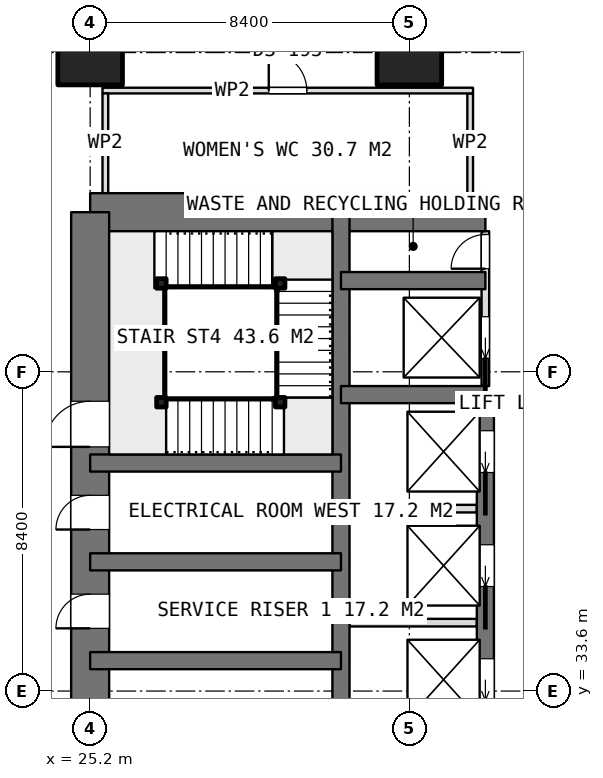
"""IFC4 building model, lengths in metres.
Left out: names, types, materials, properties, quantities, classifications, styles, units other than length and angle.
Written with IfcOpenShell. Run it as: python <this file> out.ifc"""

import sys

from ifc_helpers import new_model, si_unit, direction, frame, frame_2d, origin, origin_2d, place, context, subcontext, project, spatial, rectangle, extrude, element, fill, save


model = new_model("IFC4")
c1 = context("Model", 3, precision=1e-05, world=origin(), true_north=direction((0.0, 1.0)))
c2 = subcontext(c1, "Body", "Model", "MODEL_VIEW")
j1 = project(units=[si_unit("LENGTHUNIT", "METRE"), si_unit("PLANEANGLEUNIT", "RADIAN")], contexts=[c1])
p1 = place(None, origin())
s1 = spatial("IfcSite", under=j1, at=p1, CompositionType="ELEMENT")
p2 = place(p1, origin())
s2 = spatial("IfcBuilding", under=s1, at=p2, CompositionType="ELEMENT")
p3 = place(p2, frame((0.0, 0.0, 183.95)))
s3 = spatial("IfcBuildingStorey", under=s2, at=p3, CompositionType="ELEMENT", Elevation=183.95)
p4 = place(p3, frame((25.2, 46.2, 0.0), z_axis=(0.0, 0.0, 1.0), x_axis=(1.0, 0.0, 0.0)))
e1 = element("IfcWall", 1, at=p4, inside=s3, PredefinedType="SHEAR", context=c2, shape_type="SweptSolid", body=[
    extrude(rectangle(XDim=10.4, YDim=1.0, at=frame_2d((5.2, 0.0))), origin(), (0.0, 0.0, 1.0), 3.75),
])
p5 = place(p3, frame((25.2, 21.0, 0.0), z_axis=(0.0, 0.0, 1.0), x_axis=(0.0, 1.0, 0.0)))
e2 = element("IfcWall", 2, at=p5, inside=s3, PredefinedType="SHEAR", context=c2, shape_type="SweptSolid", body=[
    extrude(rectangle(XDim=25.2, YDim=1.0, at=frame_2d((12.6, 0.0))), origin(), (0.0, 0.0, 1.0), 3.75),
])
p6 = place(p5, frame((7.8, 0.0, 0.0)))
e3 = element("IfcOpeningElement", 3, at=p6, cuts=e2, PredefinedType="OPENING", context=c2, shape_type="SweptSolid", body=[
    extrude(rectangle(XDim=1.2, YDim=2.1, at=frame_2d((0.6, 1.05))), frame((0.0, 0.51, 0.0), z_axis=(0.0, -1.0, 0.0), x_axis=(1.0, 0.0, 0.0)), (0.0, 0.0, 1.0), 1.02),
])
p7 = place(p5, frame((14.25, 0.0, 0.0)))
e4 = element("IfcOpeningElement", 4, at=p7, cuts=e2, PredefinedType="OPENING", context=c2, shape_type="SweptSolid", body=[
    extrude(rectangle(XDim=0.9, YDim=2.1, at=frame_2d((0.45, 1.05))), frame((0.0, 0.51, 0.0), z_axis=(0.0, -1.0, 0.0), x_axis=(1.0, 0.0, 0.0)), (0.0, 0.0, 1.0), 1.02),
])
p8 = place(p5, frame((16.85, 0.0, 0.0)))
e5 = element("IfcOpeningElement", 5, at=p8, cuts=e2, PredefinedType="OPENING", context=c2, shape_type="SweptSolid", body=[
    extrude(rectangle(XDim=0.9, YDim=2.1, at=frame_2d((0.45, 1.05))), frame((0.0, 0.51, 0.0), z_axis=(0.0, -1.0, 0.0), x_axis=(1.0, 0.0, 0.0)), (0.0, 0.0, 1.0), 1.02),
])
p9 = place(p5, frame((19.025, 0.0, 0.0)))
e6 = element("IfcOpeningElement", 6, at=p9, cuts=e2, PredefinedType="OPENING", context=c2, shape_type="SweptSolid", body=[
    extrude(rectangle(XDim=1.2, YDim=2.1, at=frame_2d((0.6, 1.05))), frame((0.0, 0.51, 0.0), z_axis=(0.0, -1.0, 0.0), x_axis=(1.0, 0.0, 0.0)), (0.0, 0.0, 1.0), 1.02),
])
p10 = place(p3, frame((31.8, 21.0, 0.0), z_axis=(0.0, 0.0, 1.0), x_axis=(0.0, 1.0, 0.0)))
e7 = element("IfcWall", 7, at=p10, inside=s3, PredefinedType="SHEAR", context=c2, shape_type="SweptSolid", body=[
    extrude(rectangle(XDim=25.2, YDim=0.45, at=frame_2d((12.6, 0.0))), origin(), (0.0, 0.0, 1.0), 3.75),
])
p11 = place(p3, frame((35.6, 23.4, 0.0), z_axis=(0.0, 0.0, 1.0), x_axis=(0.0, 1.0, 0.0)))
e8 = element("IfcWall", 8, at=p11, inside=s3, PredefinedType="SHEAR", context=c2, shape_type="SweptSolid", body=[
    extrude(rectangle(XDim=18.0, YDim=0.45, at=frame_2d((9.0, 0.0))), origin(), (0.0, 0.0, 1.0), 3.75),
])
p12 = place(p11, frame((0.95, 0.0, 0.0)))
e9 = element("IfcOpeningElement", 9, at=p12, cuts=e8, PredefinedType="OPENING", context=c2, shape_type="SweptSolid", body=[
    extrude(rectangle(XDim=1.1, YDim=2.1, at=frame_2d((0.55, 1.05))), frame((0.0, 0.235, 0.0), z_axis=(0.0, -1.0, 0.0), x_axis=(1.0, 0.0, 0.0)), (0.0, 0.0, 1.0), 0.47),
])
p13 = place(p11, frame((3.95, 0.0, 0.0)))
e10 = element("IfcOpeningElement", 10, at=p13, cuts=e8, PredefinedType="OPENING", context=c2, shape_type="SweptSolid", body=[
    extrude(rectangle(XDim=1.1, YDim=2.1, at=frame_2d((0.55, 1.05))), frame((0.0, 0.235, 0.0), z_axis=(0.0, -1.0, 0.0), x_axis=(1.0, 0.0, 0.0)), (0.0, 0.0, 1.0), 0.47),
])
p14 = place(p11, frame((6.95, 0.0, 0.0)))
e11 = element("IfcOpeningElement", 11, at=p14, cuts=e8, PredefinedType="OPENING", context=c2, shape_type="SweptSolid", body=[
    extrude(rectangle(XDim=1.1, YDim=2.1, at=frame_2d((0.55, 1.05))), frame((0.0, 0.235, 0.0), z_axis=(0.0, -1.0, 0.0), x_axis=(1.0, 0.0, 0.0)), (0.0, 0.0, 1.0), 0.47),
])
p15 = place(p11, frame((9.95, 0.0, 0.0)))
e12 = element("IfcOpeningElement", 12, at=p15, cuts=e8, PredefinedType="OPENING", context=c2, shape_type="SweptSolid", body=[
    extrude(rectangle(XDim=1.1, YDim=2.1, at=frame_2d((0.55, 1.05))), frame((0.0, 0.235, 0.0), z_axis=(0.0, -1.0, 0.0), x_axis=(1.0, 0.0, 0.0)), (0.0, 0.0, 1.0), 0.47),
])
p16 = place(p11, frame((12.95, 0.0, 0.0)))
e13 = element("IfcOpeningElement", 13, at=p16, cuts=e8, PredefinedType="OPENING", context=c2, shape_type="SweptSolid", body=[
    extrude(rectangle(XDim=1.1, YDim=2.1, at=frame_2d((0.55, 1.05))), frame((0.0, 0.235, 0.0), z_axis=(0.0, -1.0, 0.0), x_axis=(1.0, 0.0, 0.0)), (0.0, 0.0, 1.0), 0.47),
])
p17 = place(p11, frame((15.95, 0.0, 0.0)))
e14 = element("IfcOpeningElement", 14, at=p17, cuts=e8, PredefinedType="OPENING", context=c2, shape_type="SweptSolid", body=[
    extrude(rectangle(XDim=1.1, YDim=2.1, at=frame_2d((0.55, 1.05))), frame((0.0, 0.235, 0.0), z_axis=(0.0, -1.0, 0.0), x_axis=(1.0, 0.0, 0.0)), (0.0, 0.0, 1.0), 0.47),
])
for number, where, z_axis, x_axis in (
    (15, (31.8, 41.4, 0.0), (0.0, 0.0, 1.0), (1.0, 0.0, 0.0)),
    (16, (31.8, 44.4, 0.0), (0.0, 0.0, 1.0), (1.0, 0.0, 0.0)),
):
    element("IfcWall", number, at=place(p3, frame(where, z_axis=z_axis, x_axis=x_axis)), inside=s3, PredefinedType="SHEAR", context=c2, shape_type="SweptSolid", body=[
        extrude(rectangle(XDim=3.8, YDim=0.45, at=frame_2d((1.9, 0.0))), origin(), (0.0, 0.0, 1.0), 3.75),
    ])
for number, where, z_axis, x_axis in (
    (17, (25.2, 34.4, 0.0), (0.0, 0.0, 1.0), (1.0, 0.0, 0.0)),
    (18, (25.2, 37.0, 0.0), (0.0, 0.0, 1.0), (1.0, 0.0, 0.0)),
    (19, (25.2, 39.6, 0.0), (0.0, 0.0, 1.0), (1.0, 0.0, 0.0)),
):
    element("IfcWall", number, at=place(p3, frame(where, z_axis=z_axis, x_axis=x_axis)), inside=s3, PredefinedType="SHEAR", context=c2, shape_type="SweptSolid", body=[
        extrude(rectangle(XDim=6.6, YDim=0.45, at=frame_2d((3.3, 0.0))), origin(), (0.0, 0.0, 1.0), 3.75),
    ])
for number, where, z_axis, x_axis in (
    (20, (25.2, 50.4, 0.0), (0.0, 0.0, 1.0), (1.0, 0.0, 0.0)),
    (21, (33.6, 50.4, 0.0), (0.0, 0.0, 1.0), (1.0, 0.0, 0.0)),
):
    element("IfcColumn", number, at=place(p3, frame(where, z_axis=z_axis, x_axis=x_axis)), inside=s3, PredefinedType="COLUMN", context=c2, shape_type="SweptSolid", body=[
        extrude(rectangle(XDim=1.7, YDim=1.7, at=origin_2d()), origin(), (0.0, 0.0, 1.0), 3.75),
    ])
for number, where, z_axis, x_axis in (
    (22, (32.025, 35.4, 0.0), (0.0, 0.0, 1.0), (1.0, 0.0, 0.0)),
    (23, (32.025, 38.4, 0.0), (0.0, 0.0, 1.0), (1.0, 0.0, 0.0)),
):
    element("IfcWall", number, at=place(p3, frame(where, z_axis=z_axis, x_axis=x_axis)), inside=s3, PredefinedType="PARTITIONING", context=c2, shape_type="SweptSolid", body=[
        extrude(rectangle(XDim=3.35, YDim=0.2, at=frame_2d((1.675, 0.0))), origin(), (0.0, 0.0, 1.0), 3.5),
    ])
p18 = place(p3, frame((35.6, 41.625, 0.0), z_axis=(0.0, 0.0, 1.0), x_axis=(0.0, 1.0, 0.0)))
e24 = element("IfcWall", 24, at=p18, inside=s3, PredefinedType="PARTITIONING", context=c2, shape_type="SweptSolid", body=[
    extrude(rectangle(XDim=4.075, YDim=0.2, at=frame_2d((2.038, 0.0))), origin(), (0.0, 0.0, 1.0), 3.5),
])
p19 = place(p18, frame((3.088, 0.0, 0.0)))
e25 = element("IfcOpeningElement", 25, at=p19, cuts=e24, PredefinedType="OPENING", context=c2, shape_type="SweptSolid", body=[
    extrude(rectangle(XDim=0.9, YDim=2.1, at=frame_2d((0.45, 1.05))), frame((0.0, 0.11, 0.0), z_axis=(0.0, -1.0, 0.0), x_axis=(1.0, 0.0, 0.0)), (0.0, 0.0, 1.0), 0.22),
])
p20 = place(p18, frame((0.725, 0.0, 0.0)))
e26 = element("IfcOpeningElement", 26, at=p20, cuts=e24, PredefinedType="OPENING", context=c2, shape_type="SweptSolid", body=[
    extrude(rectangle(XDim=1.1, YDim=2.1, at=frame_2d((0.55, 1.05))), frame((0.0, 0.11, 0.0), z_axis=(0.0, -1.0, 0.0), x_axis=(1.0, 0.0, 0.0)), (0.0, 0.0, 1.0), 0.22),
])
p21 = place(p3, frame((25.525, 49.4, 0.0), z_axis=(0.0, 0.0, 1.0), x_axis=(1.0, 0.0, 0.0)))
e27 = element("IfcWall", 27, at=p21, inside=s3, PredefinedType="PARTITIONING", context=c2, shape_type="SweptSolid", body=[
    extrude(rectangle(XDim=9.75, YDim=0.15, at=frame_2d((4.875, 0.0))), origin(), (0.0, 0.0, 1.0), 3.5),
])
p22 = place(p21, frame((4.375, 0.0, 0.0)))
e28 = element("IfcOpeningElement", 28, at=p22, cuts=e27, PredefinedType="OPENING", context=c2, shape_type="SweptSolid", body=[
    extrude(rectangle(XDim=1.0, YDim=2.1, at=frame_2d((0.5, 1.05))), frame((0.0, 0.085, 0.0), z_axis=(0.0, -1.0, 0.0), x_axis=(1.0, 0.0, 0.0)), (0.0, 0.0, 1.0), 0.17),
])
for number, where, z_axis, x_axis in (
    (29, (25.6, 46.7, 0.0), (0.0, 0.0, 1.0), (0.0, 1.0, 0.0)),
    (30, (35.2, 46.7, 0.0), (0.0, 0.0, 1.0), (0.0, 1.0, 0.0)),
):
    element("IfcWall", number, at=place(p3, frame(where, z_axis=z_axis, x_axis=x_axis)), inside=s3, PredefinedType="PARTITIONING", context=c2, shape_type="SweptSolid", body=[
        extrude(rectangle(XDim=2.625, YDim=0.15, at=frame_2d((1.312, 0.0))), origin(), (0.0, 0.0, 1.0), 3.5),
    ])
for number, where, z_axis, x_axis in (
    (31, (27.075, 41.2, 0.0), (0.0, 0.0, 1.0), (1.0, 0.0, 0.0)),
    (32, (30.2, 41.2, 0.0), (0.0, 0.0, 1.0), (1.0, 0.0, 0.0)),
    (33, (30.2, 44.325, 0.0), (0.0, 0.0, 1.0), (1.0, 0.0, 0.0)),
    (34, (27.075, 44.325, 0.0), (0.0, 0.0, 1.0), (1.0, 0.0, 0.0)),
):
    element("IfcColumn", number, at=place(p3, frame(where, z_axis=z_axis, x_axis=x_axis)), inside=s3, PredefinedType="COLUMN", context=c2, shape_type="SweptSolid", body=[
        extrude(rectangle(XDim=0.25, YDim=0.25, at=origin_2d()), origin(), (0.0, 0.0, 1.0), 3.75),
    ])
p23 = place(p7, origin())
e35 = element("IfcDoor", 35, at=p23, inside=s3, OperationType="SINGLE_SWING_LEFT", PredefinedType="DOOR", context=c2, shape_type="SweptSolid", body=[
    extrude(rectangle(XDim=0.9, YDim=2.1, at=frame_2d((0.45, 1.05))), frame((0.0, 0.025, 0.0), z_axis=(0.0, -1.0, 0.0), x_axis=(1.0, 0.0, 0.0)), (0.0, 0.0, 1.0), 0.05),
])
fill(e4, e35)
p24 = place(p8, origin())
e36 = element("IfcDoor", 36, at=p24, inside=s3, OperationType="SINGLE_SWING_LEFT", PredefinedType="DOOR", context=c2, shape_type="SweptSolid", body=[
    extrude(rectangle(XDim=0.9, YDim=2.1, at=frame_2d((0.45, 1.05))), frame((0.0, 0.025, 0.0), z_axis=(0.0, -1.0, 0.0), x_axis=(1.0, 0.0, 0.0)), (0.0, 0.0, 1.0), 0.05),
])
fill(e5, e36)
p25 = place(p19, origin())
e37 = element("IfcDoor", 37, at=p25, inside=s3, OperationType="SINGLE_SWING_LEFT", PredefinedType="DOOR", context=c2, shape_type="SweptSolid", body=[
    extrude(rectangle(XDim=0.9, YDim=2.1, at=frame_2d((0.45, 1.05))), frame((0.0, 0.025, 0.0), z_axis=(0.0, -1.0, 0.0), x_axis=(1.0, 0.0, 0.0)), (0.0, 0.0, 1.0), 0.05),
])
fill(e25, e37)
p26 = place(p15, origin())
e38 = element("IfcDoor", 38, at=p26, inside=s3, OperationType="SLIDING_TO_LEFT", PredefinedType="USERDEFINED", context=c2, shape_type="SweptSolid", body=[
    extrude(rectangle(XDim=1.1, YDim=2.1, at=frame_2d((0.55, 1.05))), frame((0.0, 0.025, 0.0), z_axis=(0.0, -1.0, 0.0), x_axis=(1.0, 0.0, 0.0)), (0.0, 0.0, 1.0), 0.05),
])
fill(e12, e38)
p27 = place(p16, origin())
e39 = element("IfcDoor", 39, at=p27, inside=s3, OperationType="SLIDING_TO_LEFT", PredefinedType="USERDEFINED", context=c2, shape_type="SweptSolid", body=[
    extrude(rectangle(XDim=1.1, YDim=2.1, at=frame_2d((0.55, 1.05))), frame((0.0, 0.025, 0.0), z_axis=(0.0, -1.0, 0.0), x_axis=(1.0, 0.0, 0.0)), (0.0, 0.0, 1.0), 0.05),
])
fill(e13, e39)
p28 = place(p17, origin())
e40 = element("IfcDoor", 40, at=p28, inside=s3, OperationType="SLIDING_TO_LEFT", PredefinedType="USERDEFINED", context=c2, shape_type="SweptSolid", body=[
    extrude(rectangle(XDim=1.1, YDim=2.1, at=frame_2d((0.55, 1.05))), frame((0.0, 0.025, 0.0), z_axis=(0.0, -1.0, 0.0), x_axis=(1.0, 0.0, 0.0)), (0.0, 0.0, 1.0), 0.05),
])
fill(e14, e40)
p29 = place(p20, origin())
e41 = element("IfcDoor", 41, at=p29, inside=s3, OperationType="SLIDING_TO_LEFT", PredefinedType="USERDEFINED", context=c2, shape_type="SweptSolid", body=[
    extrude(rectangle(XDim=1.1, YDim=2.1, at=frame_2d((0.55, 1.05))), frame((0.0, 0.025, 0.0), z_axis=(0.0, -1.0, 0.0), x_axis=(1.0, 0.0, 0.0)), (0.0, 0.0, 1.0), 0.05),
])
fill(e26, e41)
p30 = place(p22, origin())
e42 = element("IfcDoor", 42, at=p30, inside=s3, OperationType="SINGLE_SWING_LEFT", PredefinedType="DOOR", context=c2, shape_type="SweptSolid", body=[
    extrude(rectangle(XDim=1.0, YDim=2.1, at=frame_2d((0.5, 1.05))), frame((0.0, 0.025, 0.0), z_axis=(0.0, -1.0, 0.0), x_axis=(1.0, 0.0, 0.0)), (0.0, 0.0, 1.0), 0.05),
])
fill(e28, e42)
p31 = place(p9, origin())
e43 = element("IfcDoor", 43, at=p31, inside=s3, OperationType="SINGLE_SWING_RIGHT", PredefinedType="DOOR", context=c2, shape_type="SweptSolid", body=[
    extrude(rectangle(XDim=1.2, YDim=2.1, at=frame_2d((0.6, 1.05))), frame((0.0, 0.025, 0.0), z_axis=(0.0, -1.0, 0.0), x_axis=(1.0, 0.0, 0.0)), (0.0, 0.0, 1.0), 0.05),
])
fill(e6, e43)
save(model, sys.argv[1])
